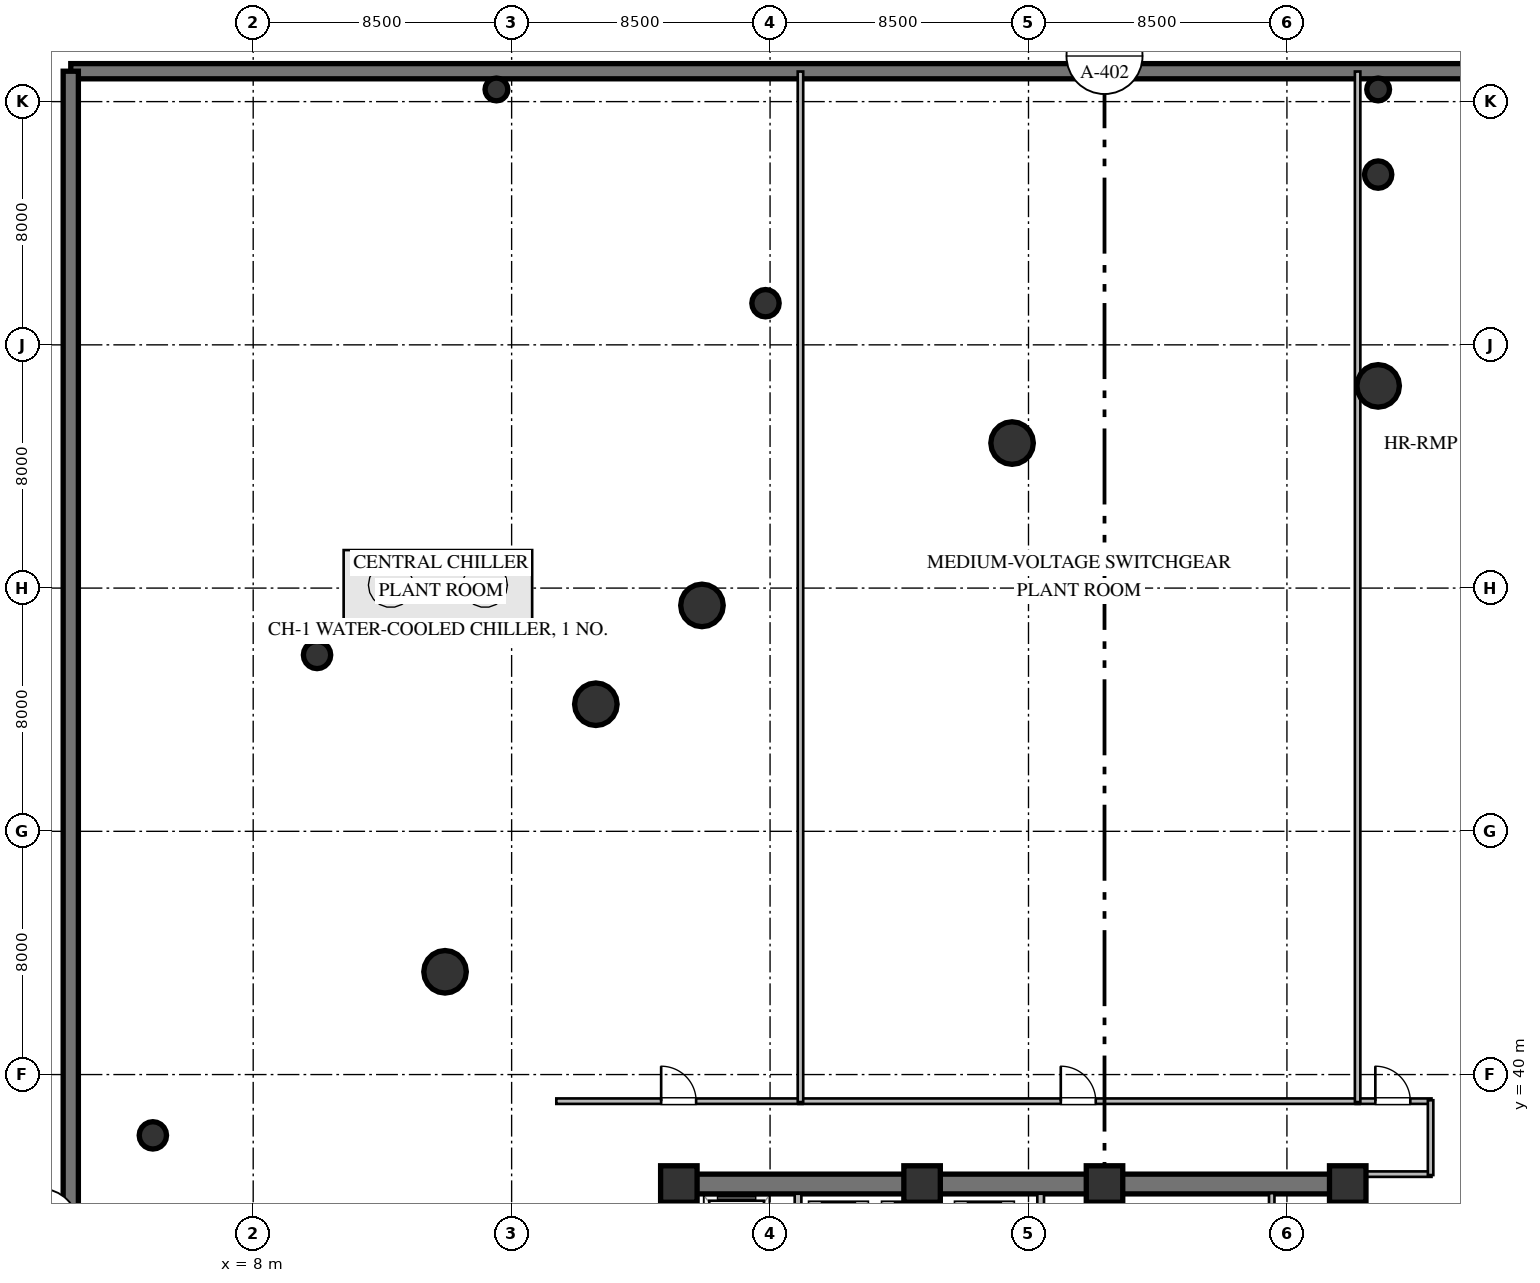
"""IFC4 building model, lengths in metres.
Left out: names, types, materials, properties, quantities, classifications, styles, units other than length and angle.
Written with IfcOpenShell. Run it as: python <this file> out.ifc"""

import sys

from ifc_helpers import new_model, si_unit, direction, frame, frame_2d, origin, origin_2d, place, context, subcontext, project, spatial, rectangle, circle, extrude, element, fill, save


model = new_model("IFC4")
c1 = context("Model", 3, precision=1e-05, world=origin(), true_north=direction((0.0, 1.0)))
c2 = subcontext(c1, "Body", "Model", "MODEL_VIEW")
j1 = project(units=[si_unit("LENGTHUNIT", "METRE"), si_unit("PLANEANGLEUNIT", "RADIAN")], contexts=[c1])
p1 = place(None, origin())
s1 = spatial("IfcSite", under=j1, at=p1, CompositionType="ELEMENT")
p2 = place(p1, origin())
s2 = spatial("IfcBuilding", under=s1, at=p2, CompositionType="ELEMENT")
p3 = place(p2, frame((0.0, 0.0, -5.4)))
s3 = spatial("IfcBuildingStorey", under=s2, at=p3, CompositionType="ELEMENT", Elevation=-5.4)
p4 = place(p3, frame((94.15, 73.0, 0.0), z_axis=(0.0, 0.0, 1.0), x_axis=(-1.0, 0.0, 0.0)))
e1 = element("IfcWall", 1, at=p4, inside=s3, PredefinedType="SHEAR", context=c2, shape_type="SweptSolid", body=[
    extrude(rectangle(XDim=92.15, YDim=0.5, at=frame_2d((46.075, 0.0))), origin(), (0.0, 0.0, 1.0), 5.2),
])
p5 = place(p3, frame((2.0, 73.0, 0.0), z_axis=(0.0, 0.0, 1.0), x_axis=(0.0, -1.0, 0.0)))
e2 = element("IfcWall", 2, at=p5, inside=s3, PredefinedType="SHEAR", context=c2, shape_type="SweptSolid", body=[
    extrude(rectangle(XDim=71.5, YDim=0.5, at=frame_2d((35.75, 0.0))), origin(), (0.0, 0.0, 1.0), 5.2),
])
for number, where, z_axis, x_axis in (
    (3, (16.0, 72.4, 0.0), (0.0, 0.0, 1.0), (1.0, 0.0, 0.0)),
    (4, (45.0, 72.4, 0.0), (0.0, 0.0, 1.0), (1.0, 0.0, 0.0)),
):
    element("IfcColumn", number, at=place(p3, frame(where, z_axis=z_axis, x_axis=x_axis)), inside=s3, PredefinedType="COLUMN", context=c2, shape_type="SweptSolid", body=[
        extrude(circle(Radius=0.375, at=origin_2d()), origin(), (0.0, 0.0, 1.0), 5.2),
    ])
p6 = place(p3, frame((21.675, 36.4, 0.0), z_axis=(0.0, 0.0, 1.0), x_axis=(1.0, 0.0, 0.0)))
e5 = element("IfcWall", 5, at=p6, inside=s3, PredefinedType="SHEAR", context=c2, shape_type="SweptSolid", body=[
    extrude(rectangle(XDim=22.65, YDim=0.65, at=frame_2d((11.325, 0.0))), origin(), (0.0, 0.0, 1.0), 5.12),
])
p7 = place(p3, frame((22.0, 23.925, 0.0), z_axis=(0.0, 0.0, 1.0), x_axis=(0.0, 1.0, 0.0)))
e6 = element("IfcWall", 6, at=p7, inside=s3, PredefinedType="SHEAR", context=c2, shape_type="SweptSolid", body=[
    extrude(rectangle(XDim=12.15, YDim=0.65, at=frame_2d((6.075, 0.0))), origin(), (0.0, 0.0, 1.0), 5.12),
])
p8 = place(p3, frame((44.0, 23.925, 0.0), z_axis=(0.0, 0.0, 1.0), x_axis=(0.0, 1.0, 0.0)))
e7 = element("IfcWall", 7, at=p8, inside=s3, PredefinedType="SHEAR", context=c2, shape_type="SweptSolid", body=[
    extrude(rectangle(XDim=12.15, YDim=0.65, at=frame_2d((6.075, 0.0))), origin(), (0.0, 0.0, 1.0), 5.12),
])
p9 = place(p8, frame((8.775, 0.0, 0.0)))
e8 = element("IfcOpeningElement", 8, at=p9, cuts=e7, PredefinedType="OPENING", context=c2, shape_type="SweptSolid", body=[
    extrude(rectangle(XDim=1.5, YDim=2.15, at=frame_2d((0.75, 1.075))), frame((0.0, 0.335, 0.0), z_axis=(0.0, -1.0, 0.0), x_axis=(1.0, 0.0, 0.0)), (0.0, 0.0, 1.0), 0.67),
])
for number, where, z_axis, x_axis in (
    (9, (44.0, 36.4, 0.0), (0.0, 0.0, 1.0), (1.0, 0.0, 0.0)),
    (10, (36.0, 36.4, 0.0), (0.0, 0.0, 1.0), (1.0, 0.0, 0.0)),
    (11, (30.0, 36.4, 0.0), (0.0, 0.0, 1.0), (1.0, 0.0, 0.0)),
    (12, (22.0, 36.4, 0.0), (0.0, 0.0, 1.0), (1.0, 0.0, 0.0)),
):
    element("IfcColumn", number, at=place(p3, frame(where, z_axis=z_axis, x_axis=x_axis)), inside=s3, PredefinedType="COLUMN", context=c2, shape_type="SweptSolid", body=[
        extrude(rectangle(XDim=1.2, YDim=1.2, at=origin_2d()), origin(), (0.0, 0.0, 1.0), 5.4),
    ])
for number, where, z_axis, x_axis in (
    (13, (45.0, 62.65, 0.0), (0.0, 0.0, 1.0), (1.0, 0.0, 0.0)),
    (14, (32.96, 60.77, 0.0), (0.0, 0.0, 1.0), (1.0, 0.0, 0.0)),
    (15, (22.76, 55.43, 0.0), (0.0, 0.0, 1.0), (1.0, 0.0, 0.0)),
    (16, (19.27, 52.18, 0.0), (0.0, 0.0, 1.0), (1.0, 0.0, 0.0)),
    (17, (14.31, 43.38, 0.0), (0.0, 0.0, 1.0), (1.0, 0.0, 0.0)),
):
    element("IfcColumn", number, at=place(p3, frame(where, z_axis=z_axis, x_axis=x_axis)), inside=s3, PredefinedType="COLUMN", context=c2, shape_type="SweptSolid", body=[
        extrude(circle(Radius=0.7, at=origin_2d()), origin(), (0.0, 0.0, 1.0), 5.4),
    ])
for number, where, z_axis, x_axis in (
    (18, (45.0, 69.6, 0.0), (0.0, 0.0, 1.0), (1.0, 0.0, 0.0)),
    (19, (24.85, 65.37, 0.0), (0.0, 0.0, 1.0), (1.0, 0.0, 0.0)),
    (20, (10.1, 53.8, 0.0), (0.0, 0.0, 1.0), (1.0, 0.0, 0.0)),
    (21, (4.7, 38.0, 0.0), (0.0, 0.0, 1.0), (1.0, 0.0, 0.0)),
):
    element("IfcColumn", number, at=place(p3, frame(where, z_axis=z_axis, x_axis=x_axis)), inside=s3, PredefinedType="COLUMN", context=c2, shape_type="SweptSolid", body=[
        extrude(circle(Radius=0.45, at=origin_2d()), origin(), (0.0, 0.0, 1.0), 5.4),
    ])
for number, where, z_axis, x_axis in (
    (22, (25.92, 33.35, 0.0), (0.0, 0.0, 1.0), (0.0, 1.0, 0.0)),
    (23, (33.9, 33.35, 0.0), (0.0, 0.0, 1.0), (0.0, 1.0, 0.0)),
):
    element("IfcWall", number, at=place(p3, frame(where, z_axis=z_axis, x_axis=x_axis)), inside=s3, PredefinedType="SOLIDWALL", context=c2, shape_type="SweptSolid", body=[
        extrude(rectangle(XDim=2.73, YDim=0.22, at=frame_2d((1.365, 0.0))), origin(), (0.0, 0.0, 1.0), 5.12),
    ])
p10 = place(p3, frame((41.5, 33.35, 0.0), z_axis=(0.0, 0.0, 1.0), x_axis=(0.0, 1.0, 0.0)))
e24 = element("IfcWall", 24, at=p10, inside=s3, PredefinedType="PARTITIONING", context=c2, shape_type="SweptSolid", body=[
    extrude(rectangle(XDim=2.75, YDim=0.18, at=frame_2d((1.375, 0.0))), origin(), (0.0, 0.0, 1.0), 5.12),
])
p11 = place(p3, frame((44.26, 39.125, 0.0), z_axis=(0.0, 0.0, 1.0), x_axis=(1.0, 0.0, 0.0)))
e25 = element("IfcWall", 25, at=p11, inside=s3, PredefinedType="PARTITIONING", context=c2, shape_type="SweptSolid", body=[
    extrude(rectangle(XDim=2.495, YDim=0.18, at=frame_2d((1.248, 0.0))), origin(), (0.0, 0.0, 1.0), 5.12),
])
p12 = place(p11, frame((0.648, 0.0, 0.0)))
e26 = element("IfcOpeningElement", 26, at=p12, cuts=e25, PredefinedType="OPENING", context=c2, shape_type="SweptSolid", body=[
    extrude(rectangle(XDim=1.15, YDim=2.1, at=frame_2d((0.575, 1.05))), frame((0.0, 0.1, 0.0), z_axis=(0.0, -1.0, 0.0), x_axis=(1.0, 0.0, 0.0)), (0.0, 0.0, 1.0), 0.2),
])
p13 = place(p3, frame((46.755, 36.725, 0.0), z_axis=(0.0, 0.0, 1.0), x_axis=(-1.0, 0.0, 0.0)))
e27 = element("IfcWall", 27, at=p13, inside=s3, PredefinedType="PARTITIONING", context=c2, shape_type="SweptSolid", body=[
    extrude(rectangle(XDim=2.495, YDim=0.18, at=frame_2d((1.248, 0.0))), origin(), (0.0, 0.0, 1.0), 4.26),
])
p14 = place(p3, frame((46.725, 39.155, 0.0), z_axis=(0.0, 0.0, 1.0), x_axis=(0.0, -1.0, 0.0)))
e28 = element("IfcWall", 28, at=p14, inside=s3, PredefinedType="PARTITIONING", context=c2, shape_type="SweptSolid", body=[
    extrude(rectangle(XDim=2.46, YDim=0.18, at=frame_2d((1.23, 0.0))), origin(), (0.0, 0.0, 1.0), 5.12),
])
p15 = place(p3, frame((17.97, 39.125, 0.0), z_axis=(0.0, 0.0, 1.0), x_axis=(1.0, 0.0, 0.0)))
e29 = element("IfcWall", 29, at=p15, inside=s3, PredefinedType="PARTITIONING", context=c2, shape_type="SweptSolid", body=[
    extrude(rectangle(XDim=8.095, YDim=0.18, at=frame_2d((4.047, 0.0))), origin(), (0.0, 0.0, 1.0), 5.12),
])
p16 = place(p15, frame((3.448, 0.0, 0.0)))
e30 = element("IfcOpeningElement", 30, at=p16, cuts=e29, PredefinedType="OPENING", context=c2, shape_type="SweptSolid", body=[
    extrude(rectangle(XDim=1.15, YDim=2.1, at=frame_2d((0.575, 1.05))), frame((0.0, 0.1, 0.0), z_axis=(0.0, -1.0, 0.0), x_axis=(1.0, 0.0, 0.0)), (0.0, 0.0, 1.0), 0.2),
])
p17 = place(p3, frame((25.935, 39.125, 0.0), z_axis=(0.0, 0.0, 1.0), x_axis=(1.0, 0.0, 0.0)))
e31 = element("IfcWall", 31, at=p17, inside=s3, PredefinedType="PARTITIONING", context=c2, shape_type="SweptSolid", body=[
    extrude(rectangle(XDim=18.455, YDim=0.18, at=frame_2d((9.228, 0.0))), origin(), (0.0, 0.0, 1.0), 5.12),
])
p18 = place(p17, frame((8.627, 0.0, 0.0)))
e32 = element("IfcOpeningElement", 32, at=p18, cuts=e31, PredefinedType="OPENING", context=c2, shape_type="SweptSolid", body=[
    extrude(rectangle(XDim=1.15, YDim=2.1, at=frame_2d((0.575, 1.05))), frame((0.0, 0.1, 0.0), z_axis=(0.0, -1.0, 0.0), x_axis=(1.0, 0.0, 0.0)), (0.0, 0.0, 1.0), 0.2),
])
p19 = place(p3, frame((44.325, 39.095, 0.0), z_axis=(0.0, 0.0, 1.0), x_axis=(0.0, 1.0, 0.0)))
e33 = element("IfcWall", 33, at=p19, inside=s3, PredefinedType="PARTITIONING", context=c2, shape_type="SweptSolid", body=[
    extrude(rectangle(XDim=33.895, YDim=0.18, at=frame_2d((16.948, 0.0))), origin(), (0.0, 0.0, 1.0), 4.65),
])
p20 = place(p3, frame((26.0, 72.99, 0.0), z_axis=(0.0, 0.0, 1.0), x_axis=(0.0, -1.0, 0.0)))
e34 = element("IfcWall", 34, at=p20, inside=s3, PredefinedType="PARTITIONING", context=c2, shape_type="SweptSolid", body=[
    extrude(rectangle(XDim=33.895, YDim=0.18, at=frame_2d((16.948, 0.0))), origin(), (0.0, 0.0, 1.0), 5.12),
])
p21 = place(p12, origin())
e35 = element("IfcDoor", 35, at=p21, inside=s3, OperationType="SINGLE_SWING_LEFT", PredefinedType="DOOR", context=c2, shape_type="SweptSolid", body=[
    extrude(rectangle(XDim=1.15, YDim=2.1, at=frame_2d((0.575, 1.05))), frame((0.0, 0.025, 0.0), z_axis=(0.0, -1.0, 0.0), x_axis=(1.0, 0.0, 0.0)), (0.0, 0.0, 1.0), 0.05),
])
fill(e26, e35)
p22 = place(p16, origin())
e36 = element("IfcDoor", 36, at=p22, inside=s3, OperationType="SINGLE_SWING_LEFT", PredefinedType="DOOR", context=c2, shape_type="SweptSolid", body=[
    extrude(rectangle(XDim=1.15, YDim=2.1, at=frame_2d((0.575, 1.05))), frame((0.0, 0.025, 0.0), z_axis=(0.0, -1.0, 0.0), x_axis=(1.0, 0.0, 0.0)), (0.0, 0.0, 1.0), 0.05),
])
fill(e30, e36)
p23 = place(p18, origin())
e37 = element("IfcDoor", 37, at=p23, inside=s3, OperationType="SINGLE_SWING_LEFT", PredefinedType="DOOR", context=c2, shape_type="SweptSolid", body=[
    extrude(rectangle(XDim=1.15, YDim=2.1, at=frame_2d((0.575, 1.05))), frame((0.0, 0.025, 0.0), z_axis=(0.0, -1.0, 0.0), x_axis=(1.0, 0.0, 0.0)), (0.0, 0.0, 1.0), 0.05),
])
fill(e32, e37)
save(model, sys.argv[1])
